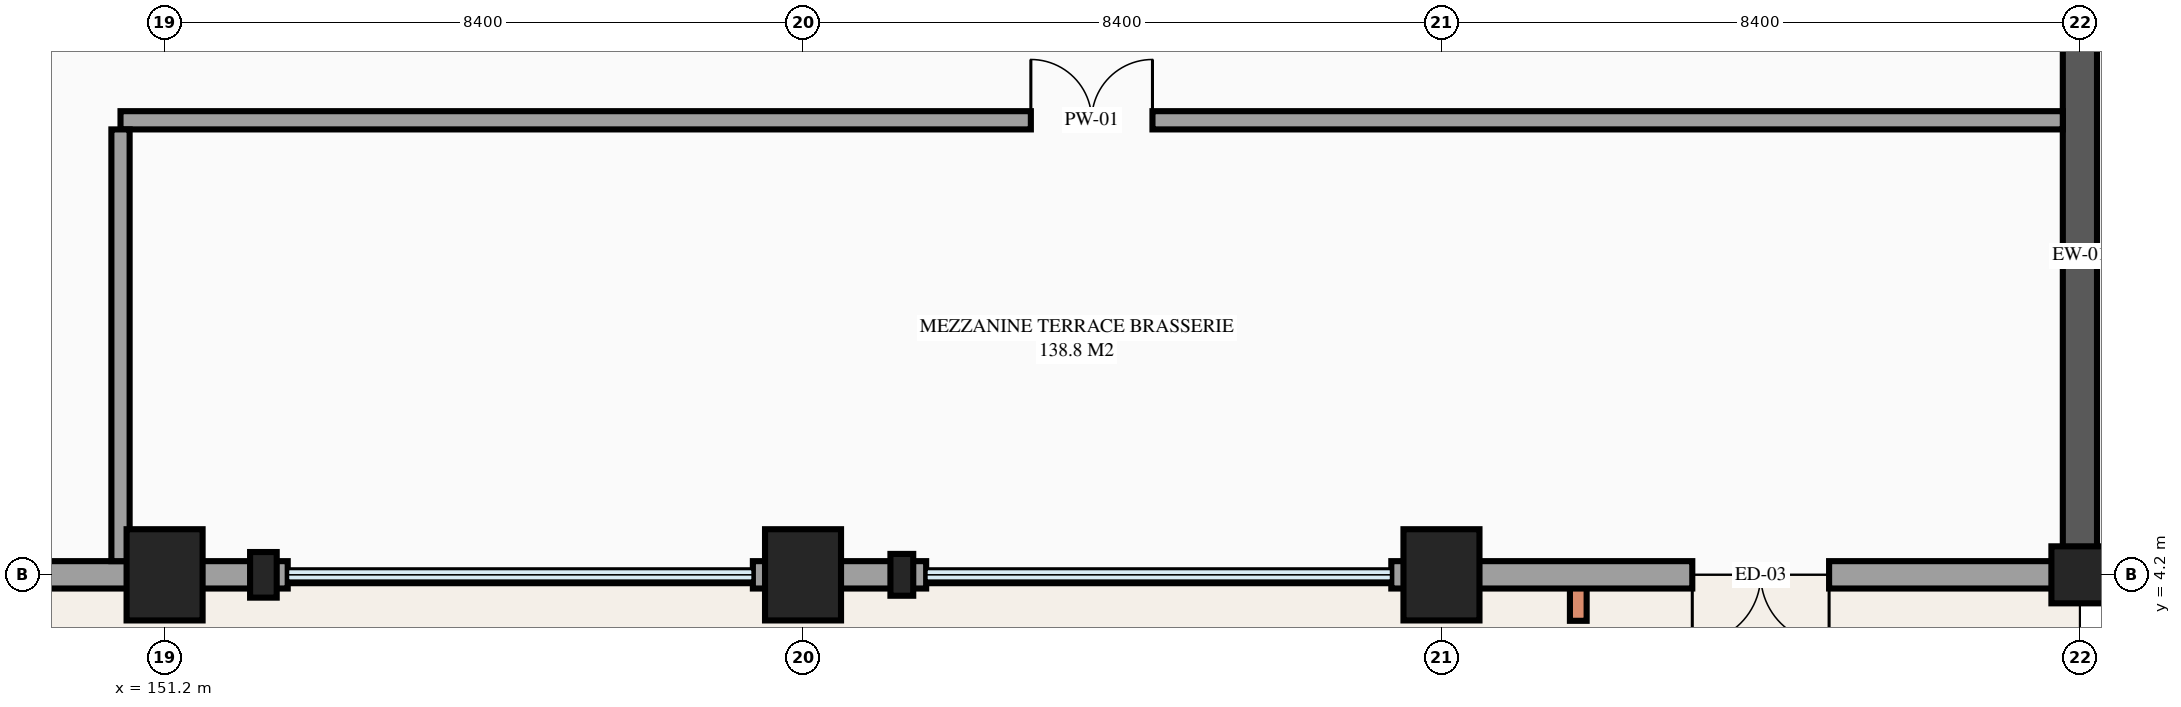
"""IFC4 building model, lengths in metres.
Left out: names, types, materials, properties, quantities, classifications, styles, units other than length and angle.
Written with IfcOpenShell. Run it as: python <this file> out.ifc"""

import sys

from ifc_helpers import new_model, si_unit, direction, frame, frame_2d, origin, origin_2d, place, context, subcontext, project, spatial, rectangle, extrude, element, fill, save


model = new_model("IFC4")
c1 = context("Model", 3, precision=1e-05, world=origin(), true_north=direction((0.0, 1.0)))
c2 = subcontext(c1, "Body", "Model", "MODEL_VIEW")
j1 = project(units=[si_unit("LENGTHUNIT", "METRE"), si_unit("PLANEANGLEUNIT", "RADIAN")], contexts=[c1])
p1 = place(None, origin())
s1 = spatial("IfcSite", under=j1, at=p1, CompositionType="ELEMENT")
p2 = place(p1, origin())
s2 = spatial("IfcBuilding", under=s1, at=p2, CompositionType="ELEMENT")
p3 = place(p2, frame((0.0, 0.0, 5.4)))
s3 = spatial("IfcBuildingStorey", under=s2, at=p3, CompositionType="ELEMENT", Elevation=5.4)
for number, where, z_axis, x_axis in (
    (1, (151.2, 4.2, 0.0), (0.0, 0.0, 1.0), (1.0, 0.0, 0.0)),
    (2, (159.6, 4.2, 0.0), (0.0, 0.0, 1.0), (1.0, 0.0, 0.0)),
    (3, (168.0, 4.2, 0.0), (0.0, 0.0, 1.0), (1.0, 0.0, 0.0)),
):
    element("IfcColumn", number, at=place(p3, frame(where, z_axis=z_axis, x_axis=x_axis)), inside=s3, PredefinedType="COLUMN", context=c2, shape_type="SweptSolid", body=[
        extrude(rectangle(XDim=1.0, YDim=1.2, at=origin_2d()), origin(), (0.0, 0.0, 1.0), 4.5),
    ])
p4 = place(p3, frame((176.4, 4.2, 0.0), z_axis=(0.0, 0.0, 1.0), x_axis=(1.0, 0.0, 0.0)))
e4 = element("IfcColumn", 4, at=p4, inside=s3, PredefinedType="COLUMN", context=c2, shape_type="SweptSolid", body=[
    extrude(rectangle(XDim=0.75, YDim=0.75, at=origin_2d()), origin(), (0.0, 0.0, 1.0), 4.5),
])
p5 = place(p3, frame((152.5, 4.2, 0.0), z_axis=(0.0, 0.0, 1.0), x_axis=(1.0, 0.0, 0.0)))
e5 = element("IfcColumn", 5, at=p5, inside=s3, PredefinedType="PILASTER", context=c2, shape_type="SweptSolid", body=[
    extrude(rectangle(XDim=0.35, YDim=0.6, at=origin_2d()), origin(), (0.0, 0.0, 1.0), 4.5),
])
p6 = place(p3, frame((160.9, 4.2, 0.0), z_axis=(0.0, 0.0, 1.0), x_axis=(1.0, 0.0, 0.0)))
e6 = element("IfcColumn", 6, at=p6, inside=s3, PredefinedType="PILASTER", context=c2, shape_type="SweptSolid", body=[
    extrude(rectangle(XDim=0.3, YDim=0.55, at=origin_2d()), origin(), (0.0, 0.0, 1.0), 4.5),
])
p7 = place(p3, frame((142.8, 4.2, 0.0), z_axis=(0.0, 0.0, 1.0), x_axis=(1.0, 0.0, 0.0)))
e7 = element("IfcWall", 7, at=p7, inside=s3, PredefinedType="STANDARD", context=c2, shape_type="SweptSolid", body=[
    extrude(rectangle(XDim=8.4, YDim=0.36, at=frame_2d((4.2, 0.0))), origin(), (0.0, 0.0, 1.0), 3.78),
])
p8 = place(p7, frame((3.75, 0.0, 0.75)))
e8 = element("IfcOpeningElement", 8, at=p8, cuts=e7, PredefinedType="OPENING", context=c2, shape_type="SweptSolid", body=[
    extrude(rectangle(XDim=0.9, YDim=1.5, at=frame_2d((0.45, 0.75))), frame((0.0, 0.19, 0.0), z_axis=(0.0, -1.0, 0.0), x_axis=(1.0, 0.0, 0.0)), (0.0, 0.0, 1.0), 0.38),
])
p9 = place(p3, frame((151.2, 4.2, 0.0), z_axis=(0.0, 0.0, 1.0), x_axis=(1.0, 0.0, 0.0)))
e9 = element("IfcWall", 9, at=p9, inside=s3, PredefinedType="STANDARD", context=c2, shape_type="SweptSolid", body=[
    extrude(rectangle(XDim=1.62, YDim=0.36, at=frame_2d((0.81, 0.0))), origin(), (0.0, 0.0, 1.0), 3.64),
])
p10 = place(p3, frame((158.94, 4.2, 0.0), z_axis=(0.0, 0.0, 1.0), x_axis=(1.0, 0.0, 0.0)))
e10 = element("IfcWall", 10, at=p10, inside=s3, PredefinedType="STANDARD", context=c2, shape_type="SweptSolid", body=[
    extrude(rectangle(XDim=0.66, YDim=0.36, at=frame_2d((0.33, 0.0))), origin(), (0.0, 0.0, 1.0), 4.5),
])
p11 = place(p3, frame((159.6, 4.2, 0.0), z_axis=(0.0, 0.0, 1.0), x_axis=(1.0, 0.0, 0.0)))
e11 = element("IfcWall", 11, at=p11, inside=s3, PredefinedType="STANDARD", context=c2, shape_type="SweptSolid", body=[
    extrude(rectangle(XDim=1.62, YDim=0.36, at=frame_2d((0.81, 0.0))), origin(), (0.0, 0.0, 1.0), 3.74),
])
p12 = place(p3, frame((167.34, 4.2, 0.0), z_axis=(0.0, 0.0, 1.0), x_axis=(1.0, 0.0, 0.0)))
e12 = element("IfcWall", 12, at=p12, inside=s3, PredefinedType="STANDARD", context=c2, shape_type="SweptSolid", body=[
    extrude(rectangle(XDim=0.66, YDim=0.36, at=frame_2d((0.33, 0.0))), origin(), (0.0, 0.0, 1.0), 4.5),
])
p13 = place(p3, frame((168.0, 4.2, 0.0), z_axis=(0.0, 0.0, 1.0), x_axis=(1.0, 0.0, 0.0)))
e13 = element("IfcWall", 13, at=p13, inside=s3, PredefinedType="STANDARD", context=c2, shape_type="SweptSolid", body=[
    extrude(rectangle(XDim=8.4, YDim=0.36, at=frame_2d((4.2, 0.0))), origin(), (0.0, 0.0, 1.0), 3.886),
])
p14 = place(p13, frame((5.1, 0.0, 0.0), z_axis=(0.0, 0.0, 1.0), x_axis=(-1.0, 0.0, 0.0)))
e14 = element("IfcOpeningElement", 14, at=p14, cuts=e13, PredefinedType="OPENING", context=c2, shape_type="SweptSolid", body=[
    extrude(rectangle(XDim=1.8, YDim=2.3, at=frame_2d((0.9, 1.15))), frame((0.0, 0.19, 0.0), z_axis=(0.0, -1.0, 0.0), x_axis=(1.0, 0.0, 0.0)), (0.0, 0.0, 1.0), 0.38),
])
p15 = place(p3, frame((176.4, 4.2, 0.0), z_axis=(0.0, 0.0, 1.0), x_axis=(0.0, 1.0, 0.0)))
e15 = element("IfcWall", 15, at=p15, inside=s3, PredefinedType="STANDARD", context=c2, shape_type="SweptSolid", body=[
    extrude(rectangle(XDim=8.4, YDim=0.45, at=frame_2d((4.2, 0.0))), origin(), (0.0, 0.0, 1.0), 4.5),
])
p16 = place(p3, frame((150.62, 10.18, 0.0), z_axis=(0.0, 0.0, 1.0), x_axis=(1.0, 0.0, 0.0)))
e16 = element("IfcWall", 16, at=p16, inside=s3, PredefinedType="PARTITIONING", context=c2, shape_type="SweptSolid", body=[
    extrude(rectangle(XDim=25.555, YDim=0.24, at=frame_2d((12.777, 0.0))), origin(), (0.0, 0.0, 1.0), 4.235),
])
p17 = place(p16, frame((11.978, 0.0, 0.0)))
e17 = element("IfcOpeningElement", 17, at=p17, cuts=e16, PredefinedType="OPENING", context=c2, shape_type="SweptSolid", body=[
    extrude(rectangle(XDim=1.6, YDim=2.25, at=frame_2d((0.8, 1.125))), frame((0.0, 0.13, 0.0), z_axis=(0.0, -1.0, 0.0), x_axis=(1.0, 0.0, 0.0)), (0.0, 0.0, 1.0), 0.26),
])
p18 = place(p3, frame((150.62, 4.38, 0.0), z_axis=(0.0, 0.0, 1.0), x_axis=(0.0, 1.0, 0.0)))
e18 = element("IfcWall", 18, at=p18, inside=s3, PredefinedType="PARTITIONING", context=c2, shape_type="SweptSolid", body=[
    extrude(rectangle(XDim=5.68, YDim=0.24, at=frame_2d((2.84, 0.0))), origin(), (0.0, 0.0, 1.0), 4.235),
])
p19 = place(p14, origin())
e19 = element("IfcDoor", 19, at=p19, inside=s3, OperationType="DOUBLE_DOOR_SINGLE_SWING", PredefinedType="DOOR", context=c2, shape_type="SweptSolid", body=[
    extrude(rectangle(XDim=1.8, YDim=2.3, at=frame_2d((0.9, 1.15))), frame((0.0, 0.025, 0.0), z_axis=(0.0, -1.0, 0.0), x_axis=(1.0, 0.0, 0.0)), (0.0, 0.0, 1.0), 0.05),
])
fill(e14, e19)
p20 = place(p17, origin())
e20 = element("IfcDoor", 20, at=p20, inside=s3, OperationType="DOUBLE_DOOR_SINGLE_SWING", PredefinedType="DOOR", context=c2, shape_type="SweptSolid", body=[
    extrude(rectangle(XDim=1.6, YDim=2.25, at=frame_2d((0.8, 1.125))), frame((0.0, 0.025, 0.0), z_axis=(0.0, -1.0, 0.0), x_axis=(1.0, 0.0, 0.0)), (0.0, 0.0, 1.0), 0.05),
])
fill(e17, e20)
save(model, sys.argv[1])
